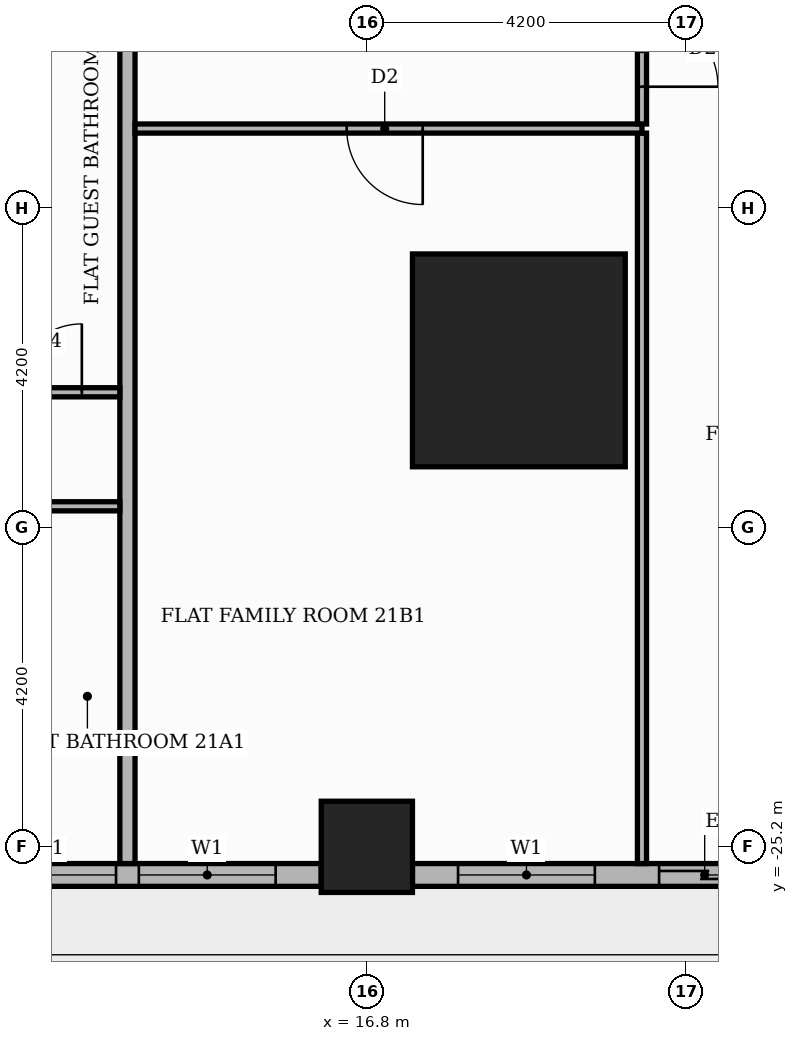
"""IFC4 building model, lengths in metres.
Left out: names, types, materials, properties, quantities, classifications, styles, units other than length and angle.
Written with IfcOpenShell. Run it as: python <this file> out.ifc"""

import sys

from ifc_helpers import new_model, si_unit, direction, frame, frame_2d, origin, origin_2d, place, context, subcontext, project, spatial, rectangle, extrude, element, fill, save


model = new_model("IFC4")
c1 = context("Model", 3, precision=1e-05, world=origin(), true_north=direction((0.0, 1.0)))
c2 = subcontext(c1, "Body", "Model", "MODEL_VIEW")
j1 = project(units=[si_unit("LENGTHUNIT", "METRE"), si_unit("PLANEANGLEUNIT", "RADIAN")], contexts=[c1])
p1 = place(None, origin())
s1 = spatial("IfcSite", under=j1, at=p1, CompositionType="ELEMENT")
p2 = place(p1, origin())
s2 = spatial("IfcBuilding", under=s1, at=p2, CompositionType="ELEMENT")
p3 = place(p2, frame((0.0, 0.0, 90.9)))
s3 = spatial("IfcBuildingStorey", under=s2, at=p3, CompositionType="ELEMENT", Elevation=90.9)
p4 = place(p3, frame((18.8, -18.8, 0.0), z_axis=(0.0, 0.0, 1.0), x_axis=(1.0, 0.0, 0.0)))
e1 = element("IfcColumn", 1, at=p4, inside=s3, PredefinedType="COLUMN", context=c2, shape_type="SweptSolid", body=[
    extrude(rectangle(XDim=2.8, YDim=2.8, at=origin_2d()), origin(), (0.0, 0.0, 1.0), 3.9),
])
p5 = place(p3, frame((16.8, -25.2, 0.0), z_axis=(0.0, 0.0, 1.0), x_axis=(1.0, 0.0, 0.0)))
e2 = element("IfcColumn", 2, at=p5, inside=s3, PredefinedType="COLUMN", context=c2, shape_type="SweptSolid", body=[
    extrude(rectangle(XDim=1.2, YDim=1.2, at=origin_2d()), origin(), (0.0, 0.0, 1.0), 3.9),
])
p6 = place(p3, frame((9.0, -25.57, 0.0), z_axis=(0.0, 0.0, 1.0), x_axis=(1.0, 0.0, 0.0)))
e3 = element("IfcWall", 3, at=p6, inside=s3, PredefinedType="STANDARD", context=c2, shape_type="SweptSolid", body=[
    extrude(rectangle(XDim=7.2, YDim=0.3, at=frame_2d((3.6, 0.0))), origin(), (0.0, 0.0, 1.0), 3.48),
])
p7 = place(p6, frame((0.6, 0.0, 0.9)))
e4 = element("IfcOpeningElement", 4, at=p7, cuts=e3, PredefinedType="OPENING", context=c2, shape_type="SweptSolid", body=[
    extrude(rectangle(XDim=1.8, YDim=2.1, at=frame_2d((0.9, 1.05))), frame((0.0, 0.16, 0.0), z_axis=(0.0, -1.0, 0.0), x_axis=(1.0, 0.0, 0.0)), (0.0, 0.0, 1.0), 0.32),
])
p8 = place(p6, frame((2.7, 0.0, 0.9)))
e5 = element("IfcOpeningElement", 5, at=p8, cuts=e3, PredefinedType="OPENING", context=c2, shape_type="SweptSolid", body=[
    extrude(rectangle(XDim=1.8, YDim=2.1, at=frame_2d((0.9, 1.05))), frame((0.0, 0.16, 0.0), z_axis=(0.0, -1.0, 0.0), x_axis=(1.0, 0.0, 0.0)), (0.0, 0.0, 1.0), 0.32),
])
p9 = place(p6, frame((4.8, 0.0, 0.9)))
e6 = element("IfcOpeningElement", 6, at=p9, cuts=e3, PredefinedType="OPENING", context=c2, shape_type="SweptSolid", body=[
    extrude(rectangle(XDim=1.8, YDim=2.1, at=frame_2d((0.9, 1.05))), frame((0.0, 0.16, 0.0), z_axis=(0.0, -1.0, 0.0), x_axis=(1.0, 0.0, 0.0)), (0.0, 0.0, 1.0), 0.32),
])
p10 = place(p3, frame((17.4, -25.57, 0.0), z_axis=(0.0, 0.0, 1.0), x_axis=(1.0, 0.0, 0.0)))
e7 = element("IfcWall", 7, at=p10, inside=s3, PredefinedType="STANDARD", context=c2, shape_type="SweptSolid", body=[
    extrude(rectangle(XDim=4.82, YDim=0.3, at=frame_2d((2.41, 0.0))), origin(), (0.0, 0.0, 1.0), 3.48),
])
p11 = place(p10, frame((0.6, 0.0, 0.9)))
e8 = element("IfcOpeningElement", 8, at=p11, cuts=e7, PredefinedType="OPENING", context=c2, shape_type="SweptSolid", body=[
    extrude(rectangle(XDim=1.8, YDim=2.1, at=frame_2d((0.9, 1.05))), frame((0.0, 0.16, 0.0), z_axis=(0.0, -1.0, 0.0), x_axis=(1.0, 0.0, 0.0)), (0.0, 0.0, 1.0), 0.32),
])
p12 = place(p10, frame((3.245, 0.0, 0.0)))
e9 = element("IfcOpeningElement", 9, at=p12, cuts=e7, PredefinedType="OPENING", context=c2, shape_type="SweptSolid", body=[
    extrude(rectangle(XDim=1.2, YDim=2.4, at=frame_2d((0.6, 1.2))), frame((0.0, 0.16, 0.0), z_axis=(0.0, -1.0, 0.0), x_axis=(1.0, 0.0, 0.0)), (0.0, 0.0, 1.0), 0.32),
])
p13 = place(p3, frame((13.65, -25.42, 0.0), z_axis=(0.0, 0.0, 1.0), x_axis=(0.0, 1.0, 0.0)))
e10 = element("IfcWall", 10, at=p13, inside=s3, PredefinedType="PARTITIONING", context=c2, shape_type="SweptSolid", body=[
    extrude(rectangle(XDim=11.67, YDim=0.2, at=frame_2d((5.835, 0.0))), origin(), (0.0, 0.0, 1.0), 3.48),
])
p14 = place(p3, frame((20.42, -25.42, 0.0), z_axis=(0.0, 0.0, 1.0), x_axis=(0.0, 1.0, 0.0)))
e11 = element("IfcWall", 11, at=p14, inside=s3, PredefinedType="PARTITIONING", context=c2, shape_type="SweptSolid", body=[
    extrude(rectangle(XDim=9.61, YDim=0.12, at=frame_2d((4.805, 0.0))), origin(), (0.0, 0.0, 1.0), 3.48),
])
p15 = place(p3, frame((-25.42, -20.72, 0.0), z_axis=(0.0, 0.0, 1.0), x_axis=(1.0, 0.0, 0.0)))
e12 = element("IfcWall", 12, at=p15, inside=s3, PredefinedType="PARTITIONING", context=c2, shape_type="SweptSolid", body=[
    extrude(rectangle(XDim=38.97, YDim=0.12, at=frame_2d((19.485, 0.0))), origin(), (0.0, 0.0, 1.0), 3.48),
])
p16 = place(p15, frame((12.32, 0.0, 0.0)))
e13 = element("IfcOpeningElement", 13, at=p16, cuts=e12, PredefinedType="OPENING", context=c2, shape_type="SweptSolid", body=[
    extrude(rectangle(XDim=1.0, YDim=2.1, at=frame_2d((0.5, 1.05))), frame((0.0, 0.07, 0.0), z_axis=(0.0, -1.0, 0.0), x_axis=(1.0, 0.0, 0.0)), (0.0, 0.0, 1.0), 0.14),
])
p17 = place(p15, frame((16.52, 0.0, 0.0)))
e14 = element("IfcOpeningElement", 14, at=p17, cuts=e12, PredefinedType="OPENING", context=c2, shape_type="SweptSolid", body=[
    extrude(rectangle(XDim=1.0, YDim=2.1, at=frame_2d((0.5, 1.05))), frame((0.0, 0.07, 0.0), z_axis=(0.0, -1.0, 0.0), x_axis=(1.0, 0.0, 0.0)), (0.0, 0.0, 1.0), 0.14),
])
p18 = place(p15, frame((23.92, 0.0, 0.0)))
e15 = element("IfcOpeningElement", 15, at=p18, cuts=e12, PredefinedType="OPENING", context=c2, shape_type="SweptSolid", body=[
    extrude(rectangle(XDim=0.9, YDim=2.1, at=frame_2d((0.45, 1.05))), frame((0.0, 0.07, 0.0), z_axis=(0.0, -1.0, 0.0), x_axis=(1.0, 0.0, 0.0)), (0.0, 0.0, 1.0), 0.14),
])
p19 = place(p15, frame((34.42, 0.0, 0.0)))
e16 = element("IfcOpeningElement", 16, at=p19, cuts=e12, PredefinedType="OPENING", context=c2, shape_type="SweptSolid", body=[
    extrude(rectangle(XDim=0.9, YDim=2.1, at=frame_2d((0.45, 1.05))), frame((0.0, 0.07, 0.0), z_axis=(0.0, -1.0, 0.0), x_axis=(1.0, 0.0, 0.0)), (0.0, 0.0, 1.0), 0.14),
])
p20 = place(p3, frame((-7.35, -19.22, 0.0), z_axis=(0.0, 0.0, 1.0), x_axis=(1.0, 0.0, 0.0)))
e17 = element("IfcWall", 17, at=p20, inside=s3, PredefinedType="PARTITIONING", context=c2, shape_type="SweptSolid", body=[
    extrude(rectangle(XDim=20.9, YDim=0.12, at=frame_2d((10.45, 0.0))), origin(), (0.0, 0.0, 1.0), 3.48),
])
p21 = place(p20, frame((2.7, 0.0, 0.0)))
e18 = element("IfcOpeningElement", 18, at=p21, cuts=e17, PredefinedType="OPENING", context=c2, shape_type="SweptSolid", body=[
    extrude(rectangle(XDim=0.9, YDim=2.1, at=frame_2d((0.45, 1.05))), frame((0.0, 0.07, 0.0), z_axis=(0.0, -1.0, 0.0), x_axis=(1.0, 0.0, 0.0)), (0.0, 0.0, 1.0), 0.14),
])
p22 = place(p20, frame((7.95, 0.0, 0.0)))
e19 = element("IfcOpeningElement", 19, at=p22, cuts=e17, PredefinedType="OPENING", context=c2, shape_type="SweptSolid", body=[
    extrude(rectangle(XDim=0.9, YDim=2.1, at=frame_2d((0.45, 1.05))), frame((0.0, 0.07, 0.0), z_axis=(0.0, -1.0, 0.0), x_axis=(1.0, 0.0, 0.0)), (0.0, 0.0, 1.0), 0.14),
])
p23 = place(p20, frame((13.05, 0.0, 0.0)))
e20 = element("IfcOpeningElement", 20, at=p23, cuts=e17, PredefinedType="OPENING", context=c2, shape_type="SweptSolid", body=[
    extrude(rectangle(XDim=0.9, YDim=2.1, at=frame_2d((0.45, 1.05))), frame((0.0, 0.07, 0.0), z_axis=(0.0, -1.0, 0.0), x_axis=(1.0, 0.0, 0.0)), (0.0, 0.0, 1.0), 0.14),
])
p24 = place(p20, frame((17.25, 0.0, 0.0)))
e21 = element("IfcOpeningElement", 21, at=p24, cuts=e17, PredefinedType="OPENING", context=c2, shape_type="SweptSolid", body=[
    extrude(rectangle(XDim=0.9, YDim=2.1, at=frame_2d((0.45, 1.05))), frame((0.0, 0.07, 0.0), z_axis=(0.0, -1.0, 0.0), x_axis=(1.0, 0.0, 0.0)), (0.0, 0.0, 1.0), 0.14),
])
p25 = place(p20, frame((19.5, 0.0, 0.0)))
e22 = element("IfcOpeningElement", 22, at=p25, cuts=e17, PredefinedType="OPENING", context=c2, shape_type="SweptSolid", body=[
    extrude(rectangle(XDim=0.9, YDim=2.1, at=frame_2d((0.45, 1.05))), frame((0.0, 0.07, 0.0), z_axis=(0.0, -1.0, 0.0), x_axis=(1.0, 0.0, 0.0)), (0.0, 0.0, 1.0), 0.14),
])
p26 = place(p3, frame((13.75, -15.75, 0.0), z_axis=(0.0, 0.0, 1.0), x_axis=(1.0, 0.0, 0.0)))
e23 = element("IfcWall", 23, at=p26, inside=s3, PredefinedType="PARTITIONING", context=c2, shape_type="SweptSolid", body=[
    extrude(rectangle(XDim=6.67, YDim=0.12, at=frame_2d((3.335, 0.0))), origin(), (0.0, 0.0, 1.0), 3.48),
])
p27 = place(p26, frame((2.785, 0.0, 0.0)))
e24 = element("IfcOpeningElement", 24, at=p27, cuts=e23, PredefinedType="OPENING", context=c2, shape_type="SweptSolid", body=[
    extrude(rectangle(XDim=1.0, YDim=2.1, at=frame_2d((0.5, 1.05))), frame((0.0, 0.07, 0.0), z_axis=(0.0, -1.0, 0.0), x_axis=(1.0, 0.0, 0.0)), (0.0, 0.0, 1.0), 0.14),
])
p28 = place(p3, frame((20.42, -15.69, 0.0), z_axis=(0.0, 0.0, 1.0), x_axis=(0.0, 1.0, 0.0)))
e25 = element("IfcWall", 25, at=p28, inside=s3, PredefinedType="PARTITIONING", context=c2, shape_type="SweptSolid", body=[
    extrude(rectangle(XDim=1.98, YDim=0.12, at=frame_2d((0.99, 0.0))), origin(), (0.0, 0.0, 1.0), 3.48),
])
p29 = place(p28, frame((0.49, 0.0, 0.0)))
e26 = element("IfcOpeningElement", 26, at=p29, cuts=e25, PredefinedType="OPENING", context=c2, shape_type="SweptSolid", body=[
    extrude(rectangle(XDim=1.0, YDim=2.1, at=frame_2d((0.5, 1.05))), frame((0.0, 0.07, 0.0), z_axis=(0.0, -1.0, 0.0), x_axis=(1.0, 0.0, 0.0)), (0.0, 0.0, 1.0), 0.14),
])
p30 = place(p8, origin())
e27 = element("IfcWindow", 27, at=p30, inside=s3, PartitioningType="SINGLE_PANEL", PredefinedType="WINDOW", context=c2, shape_type="SweptSolid", body=[
    extrude(rectangle(XDim=1.8, YDim=2.1, at=frame_2d((0.9, 1.05))), frame((0.0, 0.03, 0.0), z_axis=(0.0, -1.0, 0.0), x_axis=(1.0, 0.0, 0.0)), (0.0, 0.0, 1.0), 0.06),
])
fill(e5, e27)
p31 = place(p9, origin())
e28 = element("IfcWindow", 28, at=p31, inside=s3, PartitioningType="SINGLE_PANEL", PredefinedType="WINDOW", context=c2, shape_type="SweptSolid", body=[
    extrude(rectangle(XDim=1.8, YDim=2.1, at=frame_2d((0.9, 1.05))), frame((0.0, 0.03, 0.0), z_axis=(0.0, -1.0, 0.0), x_axis=(1.0, 0.0, 0.0)), (0.0, 0.0, 1.0), 0.06),
])
fill(e6, e28)
p32 = place(p11, origin())
e29 = element("IfcWindow", 29, at=p32, inside=s3, PartitioningType="SINGLE_PANEL", PredefinedType="WINDOW", context=c2, shape_type="SweptSolid", body=[
    extrude(rectangle(XDim=1.8, YDim=2.1, at=frame_2d((0.9, 1.05))), frame((0.0, 0.03, 0.0), z_axis=(0.0, -1.0, 0.0), x_axis=(1.0, 0.0, 0.0)), (0.0, 0.0, 1.0), 0.06),
])
fill(e8, e29)
p33 = place(p12, origin())
e30 = element("IfcDoor", 30, at=p33, inside=s3, OperationType="SLIDING_TO_RIGHT", PredefinedType="DOOR", context=c2, shape_type="SweptSolid", body=[
    extrude(rectangle(XDim=1.2, YDim=2.4, at=frame_2d((0.6, 1.2))), frame((0.0, 0.025, 0.0), z_axis=(0.0, -1.0, 0.0), x_axis=(1.0, 0.0, 0.0)), (0.0, 0.0, 1.0), 0.05),
])
fill(e9, e30)
p34 = place(p25, origin())
e31 = element("IfcDoor", 31, at=p34, inside=s3, OperationType="SINGLE_SWING_RIGHT", PredefinedType="DOOR", context=c2, shape_type="SweptSolid", body=[
    extrude(rectangle(XDim=0.9, YDim=2.1, at=frame_2d((0.45, 1.05))), frame((0.0, 0.025, 0.0), z_axis=(0.0, -1.0, 0.0), x_axis=(1.0, 0.0, 0.0)), (0.0, 0.0, 1.0), 0.05),
])
fill(e22, e31)
p35 = place(p27, frame((1.0, 0.0, 0.0), z_axis=(0.0, 0.0, 1.0), x_axis=(-1.0, 0.0, 0.0)))
e32 = element("IfcDoor", 32, at=p35, inside=s3, OperationType="SINGLE_SWING_RIGHT", PredefinedType="DOOR", context=c2, shape_type="SweptSolid", body=[
    extrude(rectangle(XDim=1.0, YDim=2.1, at=frame_2d((0.5, 1.05))), frame((0.0, 0.025, 0.0), z_axis=(0.0, -1.0, 0.0), x_axis=(1.0, 0.0, 0.0)), (0.0, 0.0, 1.0), 0.05),
])
fill(e24, e32)
p36 = place(p29, frame((1.0, 0.0, 0.0), z_axis=(0.0, 0.0, 1.0), x_axis=(-1.0, 0.0, 0.0)))
e33 = element("IfcDoor", 33, at=p36, inside=s3, OperationType="SINGLE_SWING_LEFT", PredefinedType="DOOR", context=c2, shape_type="SweptSolid", body=[
    extrude(rectangle(XDim=1.0, YDim=2.1, at=frame_2d((0.5, 1.05))), frame((0.0, 0.025, 0.0), z_axis=(0.0, -1.0, 0.0), x_axis=(1.0, 0.0, 0.0)), (0.0, 0.0, 1.0), 0.05),
])
fill(e26, e33)
save(model, sys.argv[1])
